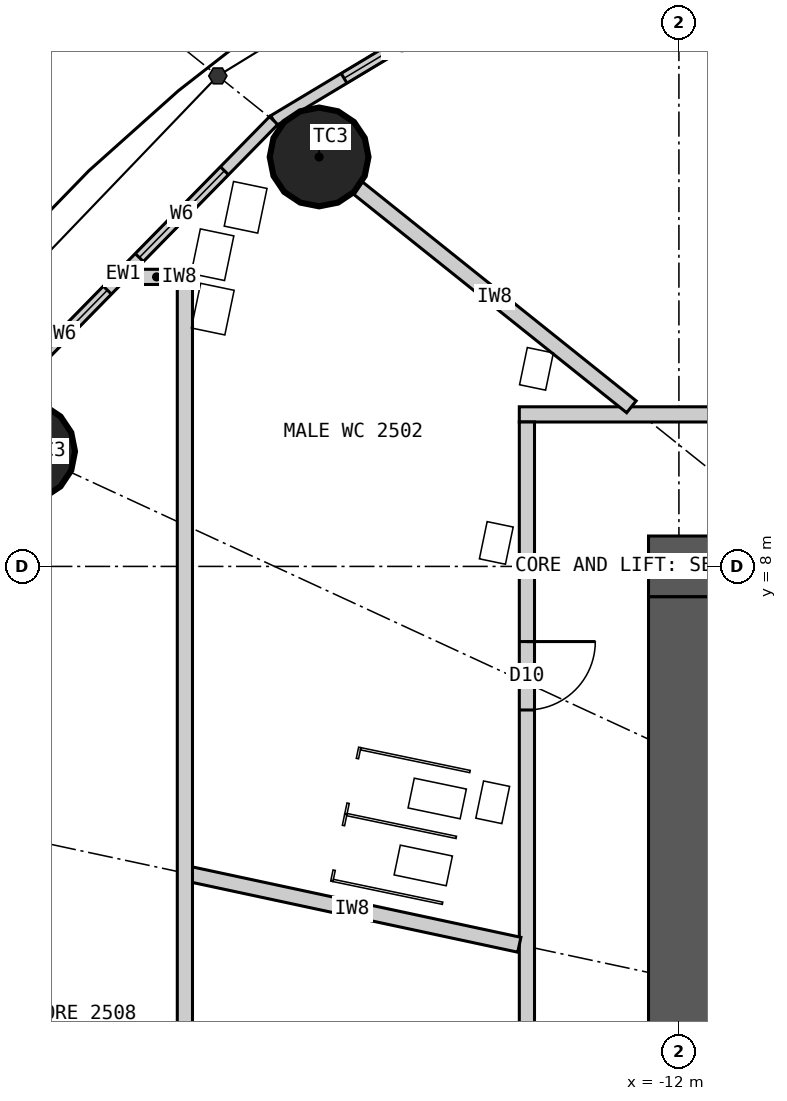
"""IFC4 building model, lengths in metres.
Left out: names, types, materials, properties, quantities, classifications, styles, units other than length and angle.
Written with IfcOpenShell. Run it as: python <this file> out.ifc"""

import sys

from ifc_helpers import new_model, si_unit, direction, frame, frame_2d, origin, origin_2d, place, context, subcontext, project, spatial, rectangle, circle, extrude, element, fill, save


model = new_model("IFC4")
c1 = context("Model", 3, precision=1e-05, world=origin(), true_north=direction((0.0, 1.0)))
c2 = subcontext(c1, "Body", "Model", "MODEL_VIEW")
j1 = project(units=[si_unit("LENGTHUNIT", "METRE"), si_unit("PLANEANGLEUNIT", "RADIAN")], contexts=[c1])
p1 = place(None, origin())
s1 = spatial("IfcSite", under=j1, at=p1, CompositionType="ELEMENT")
p2 = place(p1, origin())
s2 = spatial("IfcBuilding", under=s1, at=p2, CompositionType="ELEMENT")
p3 = place(p2, frame((0.0, 0.0, 100.2)))
s3 = spatial("IfcBuildingStorey", under=s2, at=p3, CompositionType="ELEMENT", Elevation=100.2)
for number, where, z_axis, x_axis in (
    (1, (-16.734, 13.387, 0.0), (0.0, 0.0, 1.0), (1.0, 0.0, 0.0)),
    (2, (-20.596, 9.513, 0.0), (0.0, 0.0, 1.0), (1.0, 0.0, 0.0)),
):
    element("IfcColumn", number, at=place(p3, frame(where, z_axis=z_axis, x_axis=x_axis)), inside=s3, PredefinedType="COLUMN", context=c2, shape_type="SweptSolid", body=[
        extrude(circle(Radius=0.65, at=origin_2d()), origin(), (0.0, 0.0, 1.0), 5.4),
    ])
p4 = place(p3, frame((-12.4, 8.0, 0.0), z_axis=(0.0, 0.0, 1.0), x_axis=(1.0, 0.0, 0.0)))
e3 = element("IfcWall", 3, at=p4, inside=s3, PredefinedType="SHEAR", context=c2, shape_type="SweptSolid", body=[
    extrude(rectangle(XDim=24.8, YDim=0.8, at=frame_2d((12.4, 0.0))), origin(), (0.0, 0.0, 1.0), 5.4),
])
p5 = place(p4, frame((11.1, 0.0, 0.0)))
e4 = element("IfcOpeningElement", 4, at=p5, cuts=e3, PredefinedType="OPENING", context=c2, shape_type="SweptSolid", body=[
    extrude(rectangle(XDim=1.2, YDim=2.2, at=frame_2d((0.6, 1.1))), frame((0.0, 0.41, 0.0), z_axis=(0.0, -1.0, 0.0), x_axis=(1.0, 0.0, 0.0)), (0.0, 0.0, 1.0), 0.82),
])
p6 = place(p4, frame((18.7, 0.0, 0.0)))
e5 = element("IfcOpeningElement", 5, at=p6, cuts=e3, PredefinedType="OPENING", context=c2, shape_type="SweptSolid", body=[
    extrude(rectangle(XDim=0.9, YDim=2.2, at=frame_2d((0.45, 1.1))), frame((0.0, 0.41, 0.0), z_axis=(0.0, -1.0, 0.0), x_axis=(1.0, 0.0, 0.0)), (0.0, 0.0, 1.0), 0.82),
])
p7 = place(p3, frame((-12.0, 7.6, 0.0), z_axis=(0.0, 0.0, 1.0), x_axis=(0.0, -1.0, 0.0)))
e6 = element("IfcWall", 6, at=p7, inside=s3, PredefinedType="SHEAR", context=c2, shape_type="SweptSolid", body=[
    extrude(rectangle(XDim=15.2, YDim=0.8, at=frame_2d((7.6, 0.0))), origin(), (0.0, 0.0, 1.0), 5.4),
])
p8 = place(p7, frame((6.7, 0.0, 0.0)))
e7 = element("IfcOpeningElement", 7, at=p8, cuts=e6, PredefinedType="OPENING", context=c2, shape_type="SweptSolid", body=[
    extrude(rectangle(XDim=1.8, YDim=2.2, at=frame_2d((0.9, 1.1))), frame((0.0, 0.41, 0.0), z_axis=(0.0, -1.0, 0.0), x_axis=(1.0, 0.0, 0.0)), (0.0, 0.0, 1.0), 0.82),
])
p9 = place(p3, frame((-12.221, 16.935, 0.0), z_axis=(0.0, 0.0, 1.0), x_axis=(-0.857308573723, -0.514802884044, 0.0)))
e8 = element("IfcWall", 8, at=p9, inside=s3, PredefinedType="ELEMENTEDWALL", context=c2, shape_type="SweptSolid", body=[
    extrude(rectangle(XDim=5.961, YDim=0.15, at=frame_2d((2.98, 0.0))), origin(), (0.0, 0.0, 1.0), 5.22),
])
p10 = place(p9, frame((1.081, 0.0, 0.6)))
e9 = element("IfcOpeningElement", 9, at=p10, cuts=e8, PredefinedType="OPENING", context=c2, shape_type="SweptSolid", body=[
    extrude(rectangle(XDim=1.6, YDim=3.6, at=frame_2d((0.8, 1.8))), frame((0.0, 0.085, 0.0), z_axis=(0.0, -1.0, 0.0), x_axis=(1.0, 0.0, 0.0)), (0.0, 0.0, 1.0), 0.17),
])
p11 = place(p9, frame((3.281, 0.0, 0.6)))
e10 = element("IfcOpeningElement", 10, at=p11, cuts=e8, PredefinedType="OPENING", context=c2, shape_type="SweptSolid", body=[
    extrude(rectangle(XDim=1.6, YDim=3.6, at=frame_2d((0.8, 1.8))), frame((0.0, 0.085, 0.0), z_axis=(0.0, -1.0, 0.0), x_axis=(1.0, 0.0, 0.0)), (0.0, 0.0, 1.0), 0.17),
])
p12 = place(p3, frame((-17.332, 13.866, 0.0), z_axis=(0.0, 0.0, 1.0), x_axis=(-0.700136650834, -0.714008872605, 0.0)))
e11 = element("IfcWall", 11, at=p12, inside=s3, PredefinedType="ELEMENTEDWALL", context=c2, shape_type="SweptSolid", body=[
    extrude(rectangle(XDim=5.649, YDim=0.15, at=frame_2d((2.825, 0.0))), origin(), (0.0, 0.0, 1.0), 5.22),
])
p13 = place(p12, frame((0.925, 0.0, 0.6)))
e12 = element("IfcOpeningElement", 12, at=p13, cuts=e11, PredefinedType="OPENING", context=c2, shape_type="SweptSolid", body=[
    extrude(rectangle(XDim=1.6, YDim=3.6, at=frame_2d((0.8, 1.8))), frame((0.0, 0.085, 0.0), z_axis=(0.0, -1.0, 0.0), x_axis=(1.0, 0.0, 0.0)), (0.0, 0.0, 1.0), 0.17),
])
p14 = place(p12, frame((3.125, 0.0, 0.6)))
e13 = element("IfcOpeningElement", 13, at=p14, cuts=e11, PredefinedType="OPENING", context=c2, shape_type="SweptSolid", body=[
    extrude(rectangle(XDim=1.6, YDim=3.6, at=frame_2d((0.8, 1.8))), frame((0.0, 0.085, 0.0), z_axis=(0.0, -1.0, 0.0), x_axis=(1.0, 0.0, 0.0)), (0.0, 0.0, 1.0), 0.17),
])
p15 = place(p3, frame((-14.1, 10.0, 0.0), z_axis=(0.0, 0.0, 1.0), x_axis=(1.0, 0.0, 0.0)))
e14 = element("IfcWall", 14, at=p15, inside=s3, PredefinedType="PARTITIONING", context=c2, shape_type="SweptSolid", body=[
    extrude(rectangle(XDim=28.2, YDim=0.2, at=frame_2d((14.1, 0.0))), origin(), (0.0, 0.0, 1.0), 5.22),
])
p16 = place(p15, frame((13.2, 0.0, 0.0)))
e15 = element("IfcOpeningElement", 15, at=p16, cuts=e14, PredefinedType="OPENING", context=c2, shape_type="SweptSolid", body=[
    extrude(rectangle(XDim=1.8, YDim=2.4, at=frame_2d((0.9, 1.2))), frame((0.0, 0.11, 0.0), z_axis=(0.0, -1.0, 0.0), x_axis=(1.0, 0.0, 0.0)), (0.0, 0.0, 1.0), 0.22),
])
p17 = place(p15, frame((24.7, 0.0, 0.0)))
e16 = element("IfcOpeningElement", 16, at=p17, cuts=e14, PredefinedType="OPENING", context=c2, shape_type="SweptSolid", body=[
    extrude(rectangle(XDim=1.8, YDim=2.4, at=frame_2d((0.9, 1.2))), frame((0.0, 0.11, 0.0), z_axis=(0.0, -1.0, 0.0), x_axis=(1.0, 0.0, 0.0)), (0.0, 0.0, 1.0), 0.22),
])
p18 = place(p3, frame((-14.0, 9.9, 0.0), z_axis=(0.0, 0.0, 1.0), x_axis=(0.0, -1.0, 0.0)))
e17 = element("IfcWall", 17, at=p18, inside=s3, PredefinedType="PARTITIONING", context=c2, shape_type="SweptSolid", body=[
    extrude(rectangle(XDim=19.8, YDim=0.2, at=frame_2d((9.9, 0.0))), origin(), (0.0, 0.0, 1.0), 5.22),
])
p19 = place(p18, frame((2.889, 0.0, 0.0)))
e18 = element("IfcOpeningElement", 18, at=p19, cuts=e17, PredefinedType="OPENING", context=c2, shape_type="SweptSolid", body=[
    extrude(rectangle(XDim=0.9, YDim=2.1, at=frame_2d((0.45, 1.05))), frame((0.0, 0.11, 0.0), z_axis=(0.0, -1.0, 0.0), x_axis=(1.0, 0.0, 0.0)), (0.0, 0.0, 1.0), 0.22),
])
p20 = place(p18, frame((9.45, 0.0, 0.0)))
e19 = element("IfcOpeningElement", 19, at=p20, cuts=e17, PredefinedType="OPENING", context=c2, shape_type="SweptSolid", body=[
    extrude(rectangle(XDim=0.9, YDim=2.1, at=frame_2d((0.45, 1.05))), frame((0.0, 0.11, 0.0), z_axis=(0.0, -1.0, 0.0), x_axis=(1.0, 0.0, 0.0)), (0.0, 0.0, 1.0), 0.22),
])
p21 = place(p18, frame((14.167, 0.0, 0.0)))
e20 = element("IfcOpeningElement", 20, at=p21, cuts=e17, PredefinedType="OPENING", context=c2, shape_type="SweptSolid", body=[
    extrude(rectangle(XDim=1.0, YDim=2.2, at=frame_2d((0.5, 1.1))), frame((0.0, 0.11, 0.0), z_axis=(0.0, -1.0, 0.0), x_axis=(1.0, 0.0, 0.0)), (0.0, 0.0, 1.0), 0.22),
])
p22 = place(p18, frame((17.756, 0.0, 0.0)))
e21 = element("IfcOpeningElement", 21, at=p22, cuts=e17, PredefinedType="OPENING", context=c2, shape_type="SweptSolid", body=[
    extrude(rectangle(XDim=0.9, YDim=2.2, at=frame_2d((0.45, 1.1))), frame((0.0, 0.11, 0.0), z_axis=(0.0, -1.0, 0.0), x_axis=(1.0, 0.0, 0.0)), (0.0, 0.0, 1.0), 0.22),
])
p23 = place(p3, frame((-12.625, 10.1, 0.0), z_axis=(0.0, 0.0, 1.0), x_axis=(-0.780863644897, 0.624701503182, 0.0)))
e22 = element("IfcWall", 22, at=p23, inside=s3, PredefinedType="PARTITIONING", context=c2, shape_type="SweptSolid", body=[
    extrude(rectangle(XDim=4.612, YDim=0.2, at=frame_2d((2.306, 0.0))), origin(), (0.0, 0.0, 1.0), 4.37),
])
p24 = place(p3, frame((-14.1, 3.022, 0.0), z_axis=(0.0, 0.0, 1.0), x_axis=(-0.977789708591, 0.209588372228, 0.0)))
e23 = element("IfcWall", 23, at=p24, inside=s3, PredefinedType="PARTITIONING", context=c2, shape_type="SweptSolid", body=[
    extrude(rectangle(XDim=4.5, YDim=0.2, at=frame_2d((2.25, 0.0))), origin(), (0.0, 0.0, 1.0), 5.22),
])
p25 = place(p3, frame((-19.245, 11.809, 0.0), z_axis=(0.0, 0.0, 1.0), x_axis=(1.0, 0.0, 0.0)))
e24 = element("IfcWall", 24, at=p25, inside=s3, PredefinedType="PARTITIONING", context=c2, shape_type="SweptSolid", body=[
    extrude(rectangle(XDim=0.745, YDim=0.2, at=frame_2d((0.373, 0.0))), origin(), (0.0, 0.0, 1.0), 5.22),
])
p26 = place(p3, frame((-18.5, 11.809, 0.0), z_axis=(0.0, 0.0, 1.0), x_axis=(0.0, -1.0, 0.0)))
e25 = element("IfcWall", 25, at=p26, inside=s3, PredefinedType="PARTITIONING", context=c2, shape_type="SweptSolid", body=[
    extrude(rectangle(XDim=20.354, YDim=0.2, at=frame_2d((10.177, 0.0))), origin(), (0.0, 0.0, 1.0), 5.22),
])
p27 = place(p11, origin())
e26 = element("IfcWindow", 26, at=p27, inside=s3, PartitioningType="SINGLE_PANEL", PredefinedType="WINDOW", context=c2, shape_type="SweptSolid", body=[
    extrude(rectangle(XDim=1.6, YDim=3.6, at=frame_2d((0.8, 1.8))), frame((0.0, 0.03, 0.0), z_axis=(0.0, -1.0, 0.0), x_axis=(1.0, 0.0, 0.0)), (0.0, 0.0, 1.0), 0.06),
])
fill(e10, e26)
p28 = place(p13, origin())
e27 = element("IfcWindow", 27, at=p28, inside=s3, PartitioningType="SINGLE_PANEL", PredefinedType="WINDOW", context=c2, shape_type="SweptSolid", body=[
    extrude(rectangle(XDim=1.6, YDim=3.6, at=frame_2d((0.8, 1.8))), frame((0.0, 0.03, 0.0), z_axis=(0.0, -1.0, 0.0), x_axis=(1.0, 0.0, 0.0)), (0.0, 0.0, 1.0), 0.06),
])
fill(e12, e27)
p29 = place(p14, origin())
e28 = element("IfcWindow", 28, at=p29, inside=s3, PartitioningType="SINGLE_PANEL", PredefinedType="WINDOW", context=c2, shape_type="SweptSolid", body=[
    extrude(rectangle(XDim=1.6, YDim=3.6, at=frame_2d((0.8, 1.8))), frame((0.0, 0.03, 0.0), z_axis=(0.0, -1.0, 0.0), x_axis=(1.0, 0.0, 0.0)), (0.0, 0.0, 1.0), 0.06),
])
fill(e13, e28)
p30 = place(p19, origin())
e29 = element("IfcDoor", 29, at=p30, inside=s3, OperationType="SINGLE_SWING_LEFT", PredefinedType="DOOR", context=c2, shape_type="SweptSolid", body=[
    extrude(rectangle(XDim=0.9, YDim=2.1, at=frame_2d((0.45, 1.05))), frame((0.0, 0.025, 0.0), z_axis=(0.0, -1.0, 0.0), x_axis=(1.0, 0.0, 0.0)), (0.0, 0.0, 1.0), 0.05),
])
fill(e18, e29)
save(model, sys.argv[1])
